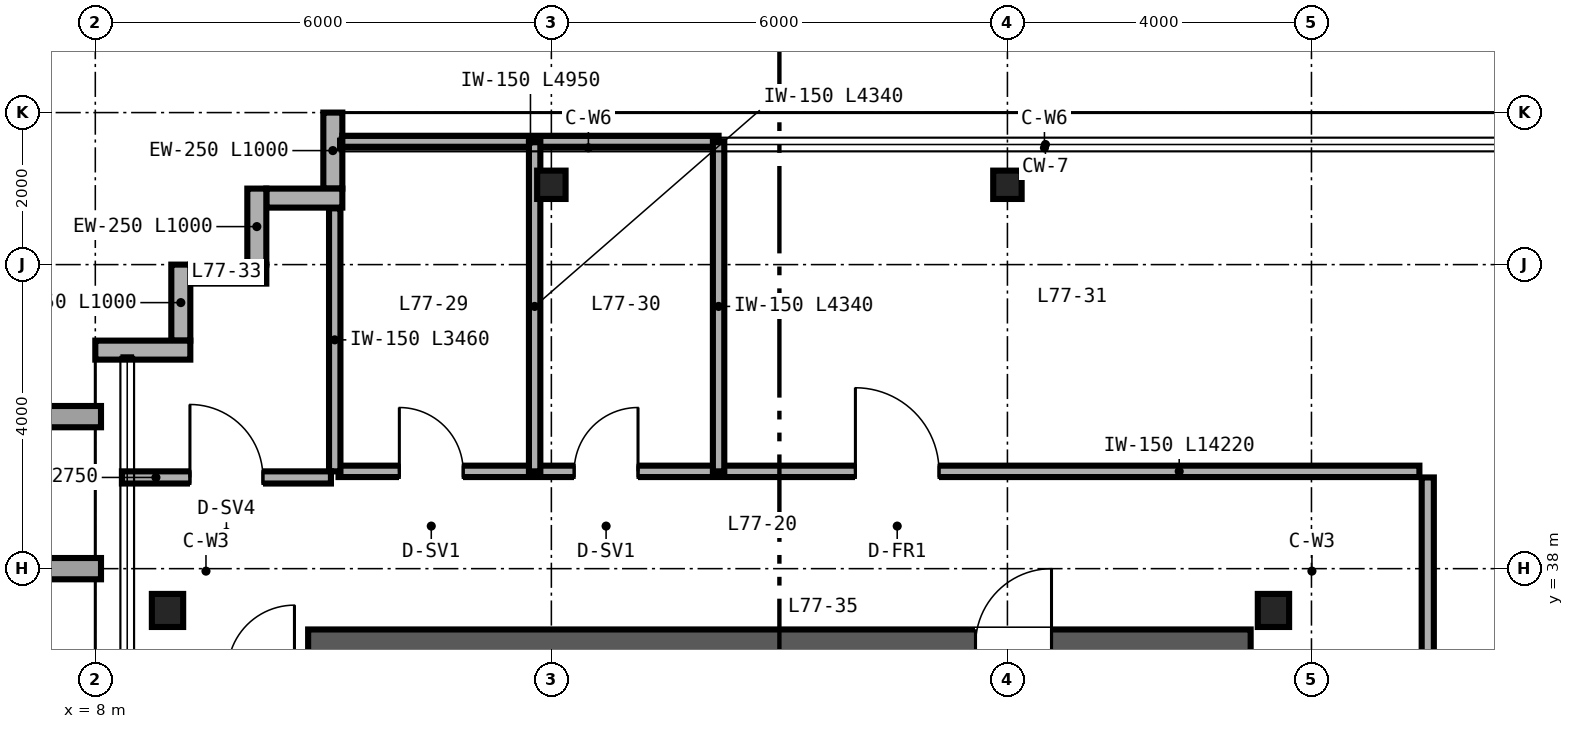
"""IFC4 building model, lengths in metres.
Left out: names, types, materials, properties, quantities, classifications, styles, units other than length and angle.
Written with IfcOpenShell. Run it as: python <this file> out.ifc"""

import sys

from ifc_helpers import new_model, si_unit, direction, frame, frame_2d, origin, origin_2d, place, context, subcontext, project, spatial, rectangle, i_section, extrude, source, transform, mapped, element, fill, save


model = new_model("IFC4")
c1 = context("Model", 3, precision=1e-05, world=origin(), true_north=direction((0.0, 1.0)))
c2 = subcontext(c1, "Body", "Model", "MODEL_VIEW")
j1 = project(units=[si_unit("LENGTHUNIT", "METRE"), si_unit("PLANEANGLEUNIT", "RADIAN")], contexts=[c1])
p1 = place(None, origin())
s1 = spatial("IfcSite", under=j1, at=p1, CompositionType="ELEMENT")
p2 = place(p1, origin())
s2 = spatial("IfcBuilding", under=s1, at=p2, CompositionType="ELEMENT")
p3 = place(p2, frame((0.0, 0.0, 301.2)))
s3 = spatial("IfcBuildingStorey", under=s2, at=p3, CompositionType="ELEMENT", Elevation=301.2)
p4 = place(p3, frame((10.8, 37.0, 0.0), z_axis=(0.0, 0.0, 1.0), x_axis=(1.0, 0.0, 0.0)))
e1 = element("IfcWall", 1, at=p4, inside=s3, PredefinedType="SHEAR", context=c2, shape_type="SweptSolid", body=[
    extrude(rectangle(XDim=12.4, YDim=0.4, at=frame_2d((6.2, 0.0))), origin(), (0.0, 0.0, 1.0), 3.92),
])
p5 = place(p4, frame((8.78, 0.0, 0.0)))
e2 = element("IfcOpeningElement", 2, at=p5, cuts=e1, PredefinedType="OPENING", context=c2, shape_type="SweptSolid", body=[
    extrude(rectangle(XDim=1.0, YDim=2.15, at=frame_2d((0.5, 1.075))), frame((0.0, 0.21, 0.0), z_axis=(0.0, -1.0, 0.0), x_axis=(1.0, 0.0, 0.0)), (0.0, 0.0, 1.0), 0.42),
])
m1 = source(origin(), c2, "Body", "SweptSolid", [
    extrude(i_section(OverallWidth=0.412, OverallDepth=0.435, WebThickness=0.036, FlangeThickness=0.057, FilletRadius=0.025, at=origin_2d()), origin(), (0.0, 0.0, 1.0), 3.92),
])
for number, where, z_axis, x_axis in (
    (3, (8.95, 37.45, 0.0), (0.0, 0.0, 1.0), (1.0, 0.0, 0.0)),
    (4, (23.5, 37.45, 0.0), (0.0, 0.0, 1.0), (1.0, 0.0, 0.0)),
):
    element("IfcColumn", number, at=place(p3, frame(where, z_axis=z_axis, x_axis=x_axis)), inside=s3, PredefinedType="COLUMN", context=c2, shape_type="MappedRepresentation", body=[
        mapped(m1, transform((0.0, 0.0, 0.0), scale=1.0)),
    ])
m2 = source(origin(), c2, "Body", "SweptSolid", [
    extrude(i_section(OverallWidth=0.374, OverallDepth=0.373, WebThickness=0.016, FlangeThickness=0.026, FilletRadius=0.025, at=origin_2d()), origin(), (0.0, 0.0, 1.0), 3.92),
])
for number, where, z_axis, x_axis in (
    (5, (14.0, 43.05, 0.0), (0.0, 0.0, 1.0), (1.0, 0.0, 0.0)),
    (6, (20.0, 43.05, 0.0), (0.0, 0.0, 1.0), (1.0, 0.0, 0.0)),
):
    element("IfcColumn", number, at=place(p3, frame(where, z_axis=z_axis, x_axis=x_axis)), inside=s3, PredefinedType="COLUMN", context=c2, shape_type="MappedRepresentation", body=[
        mapped(m2, transform((0.0, 0.0, 0.0), scale=1.0)),
    ])
for number, where, z_axis, x_axis in (
    (7, (11.125, 44.0, 0.0), (0.0, 0.0, 1.0), (0.0, -1.0, 0.0)),
    (8, (11.25, 42.875, 0.0), (0.0, 0.0, 1.0), (-1.0, 0.0, 0.0)),
    (9, (10.125, 43.0, 0.0), (0.0, 0.0, 1.0), (0.0, -1.0, 0.0)),
    (10, (10.25, 41.875, 0.0), (0.0, 0.0, 1.0), (-1.0, 0.0, 0.0)),
    (11, (9.125, 42.0, 0.0), (0.0, 0.0, 1.0), (0.0, -1.0, 0.0)),
):
    element("IfcWall", number, at=place(p3, frame(where, z_axis=z_axis, x_axis=x_axis)), inside=s3, PredefinedType="SOLIDWALL", context=c2, shape_type="SweptSolid", body=[
        extrude(rectangle(XDim=1.0, YDim=0.25, at=frame_2d((0.5, 0.0))), origin(), (0.0, 0.0, 1.0), 3.92),
    ])
p6 = place(p3, frame((9.25, 40.875, 0.0), z_axis=(0.0, 0.0, 1.0), x_axis=(-1.0, 0.0, 0.0)))
e12 = element("IfcWall", 12, at=p6, inside=s3, PredefinedType="SOLIDWALL", context=c2, shape_type="SweptSolid", body=[
    extrude(rectangle(XDim=1.25, YDim=0.25, at=frame_2d((0.625, 0.0))), origin(), (0.0, 0.0, 1.0), 3.92),
])
p7 = place(p3, frame((25.53, 12.8, 0.0), z_axis=(0.0, 0.0, 1.0), x_axis=(0.0, 1.0, 0.0)))
e13 = element("IfcWall", 13, at=p7, inside=s3, PredefinedType="PARTITIONING", context=c2, shape_type="SweptSolid", body=[
    extrude(rectangle(XDim=26.4, YDim=0.16, at=frame_2d((13.2, 0.0))), origin(), (0.0, 0.0, 1.0), 3.064),
])
p8 = place(p7, frame((4.5, 0.0, 0.0)))
e14 = element("IfcOpeningElement", 14, at=p8, cuts=e13, PredefinedType="OPENING", context=c2, shape_type="SweptSolid", body=[
    extrude(rectangle(XDim=1.1, YDim=2.15, at=frame_2d((0.55, 1.075))), frame((0.0, 0.09, 0.0), z_axis=(0.0, -1.0, 0.0), x_axis=(1.0, 0.0, 0.0)), (0.0, 0.0, 1.0), 0.18),
])
p9 = place(p7, frame((19.5, 0.0, 0.0)))
e15 = element("IfcOpeningElement", 15, at=p9, cuts=e13, PredefinedType="OPENING", context=c2, shape_type="SweptSolid", body=[
    extrude(rectangle(XDim=1.0, YDim=2.15, at=frame_2d((0.5, 1.075))), frame((0.0, 0.09, 0.0), z_axis=(0.0, -1.0, 0.0), x_axis=(1.0, 0.0, 0.0)), (0.0, 0.0, 1.0), 0.18),
])
p10 = place(p3, frame((11.2, 39.28, 0.0), z_axis=(0.0, 0.0, 1.0), x_axis=(1.0, 0.0, 0.0)))
e16 = element("IfcWall", 16, at=p10, inside=s3, PredefinedType="PARTITIONING", context=c2, shape_type="SweptSolid", body=[
    extrude(rectangle(XDim=14.22, YDim=0.15, at=frame_2d((7.11, 0.0))), origin(), (0.0, 0.0, 1.0), 3.92),
])
p11 = place(p10, frame((0.8, 0.0, 0.0)))
e17 = element("IfcOpeningElement", 17, at=p11, cuts=e16, PredefinedType="OPENING", context=c2, shape_type="SweptSolid", body=[
    extrude(rectangle(XDim=0.84, YDim=2.1, at=frame_2d((0.42, 1.05))), frame((0.0, 0.085, 0.0), z_axis=(0.0, -1.0, 0.0), x_axis=(1.0, 0.0, 0.0)), (0.0, 0.0, 1.0), 0.17),
])
p12 = place(p10, frame((3.1, 0.0, 0.0)))
e18 = element("IfcOpeningElement", 18, at=p12, cuts=e16, PredefinedType="OPENING", context=c2, shape_type="SweptSolid", body=[
    extrude(rectangle(XDim=0.84, YDim=2.1, at=frame_2d((0.42, 1.05))), frame((0.0, 0.085, 0.0), z_axis=(0.0, -1.0, 0.0), x_axis=(1.0, 0.0, 0.0)), (0.0, 0.0, 1.0), 0.17),
])
p13 = place(p10, frame((6.8, 0.0, 0.0)))
e19 = element("IfcOpeningElement", 19, at=p13, cuts=e16, PredefinedType="OPENING", context=c2, shape_type="SweptSolid", body=[
    extrude(rectangle(XDim=1.1, YDim=2.15, at=frame_2d((0.55, 1.075))), frame((0.0, 0.085, 0.0), z_axis=(0.0, -1.0, 0.0), x_axis=(1.0, 0.0, 0.0)), (0.0, 0.0, 1.0), 0.17),
])
p14 = place(p3, frame((11.15, 39.28, 0.0), z_axis=(0.0, 0.0, 1.0), x_axis=(0.0, 1.0, 0.0)))
e20 = element("IfcWall", 20, at=p14, inside=s3, PredefinedType="PARTITIONING", context=c2, shape_type="SweptSolid", body=[
    extrude(rectangle(XDim=3.46, YDim=0.15, at=frame_2d((1.73, 0.0))), origin(), (0.0, 0.0, 1.0), 3.92),
])
p15 = place(p3, frame((11.25, 43.62, 0.0), z_axis=(0.0, 0.0, 1.0), x_axis=(1.0, 0.0, 0.0)))
e21 = element("IfcWall", 21, at=p15, inside=s3, PredefinedType="PARTITIONING", context=c2, shape_type="SweptSolid", body=[
    extrude(rectangle(XDim=4.95, YDim=0.15, at=frame_2d((2.475, 0.0))), origin(), (0.0, 0.0, 1.0), 3.92),
])
for number, where, z_axis, x_axis in (
    (22, (13.78, 39.28, 0.0), (0.0, 0.0, 1.0), (0.0, 1.0, 0.0)),
    (23, (16.2, 39.28, 0.0), (0.0, 0.0, 1.0), (0.0, 1.0, 0.0)),
):
    element("IfcWall", number, at=place(p3, frame(where, z_axis=z_axis, x_axis=x_axis)), inside=s3, PredefinedType="PARTITIONING", context=c2, shape_type="SweptSolid", body=[
        extrude(rectangle(XDim=4.34, YDim=0.15, at=frame_2d((2.17, 0.0))), origin(), (0.0, 0.0, 1.0), 3.227),
    ])
p16 = place(p3, frame((8.35, 39.2, 0.0), z_axis=(0.0, 0.0, 1.0), x_axis=(1.0, 0.0, 0.0)))
e24 = element("IfcWall", 24, at=p16, inside=s3, PredefinedType="PARTITIONING", context=c2, shape_type="SweptSolid", body=[
    extrude(rectangle(XDim=2.75, YDim=0.16, at=frame_2d((1.375, 0.0))), origin(), (0.0, 0.0, 1.0), 3.92),
])
p17 = place(p16, frame((0.895, 0.0, 0.0)))
e25 = element("IfcOpeningElement", 25, at=p17, cuts=e24, PredefinedType="OPENING", context=c2, shape_type="SweptSolid", body=[
    extrude(rectangle(XDim=0.96, YDim=2.15, at=frame_2d((0.48, 1.075))), frame((0.0, 0.09, 0.0), z_axis=(0.0, -1.0, 0.0), x_axis=(1.0, 0.0, 0.0)), (0.0, 0.0, 1.0), 0.18),
])
m3 = source(origin(), c2, "Body", "SweptSolid", [
    extrude(rectangle(XDim=1.0, YDim=2.15, at=frame_2d((0.5, 1.075))), frame((0.0, 0.025, 0.0), z_axis=(0.0, -1.0, 0.0), x_axis=(1.0, 0.0, 0.0)), (0.0, 0.0, 1.0), 0.05),
])
p18 = place(p5, origin())
e26 = element("IfcDoor", 26, at=p18, inside=s3, OperationType="SINGLE_SWING_RIGHT", PredefinedType="DOOR", context=c2, shape_type="MappedRepresentation", body=[
    mapped(m3, transform((0.0, 0.0, 0.0), scale=1.0)),
])
fill(e2, e26)
m4 = source(origin(), c2, "Body", "SweptSolid", [
    extrude(rectangle(XDim=0.84, YDim=2.1, at=frame_2d((0.42, 1.05))), frame((0.0, 0.025, 0.0), z_axis=(0.0, -1.0, 0.0), x_axis=(1.0, 0.0, 0.0)), (0.0, 0.0, 1.0), 0.05),
])
p19 = place(p11, origin())
e27 = element("IfcDoor", 27, at=p19, inside=s3, OperationType="SINGLE_SWING_LEFT", PredefinedType="DOOR", context=c2, shape_type="MappedRepresentation", body=[
    mapped(m4, transform((0.0, 0.0, 0.0), scale=1.0)),
])
fill(e17, e27)
p20 = place(p12, origin())
e28 = element("IfcDoor", 28, at=p20, inside=s3, OperationType="SINGLE_SWING_RIGHT", PredefinedType="DOOR", context=c2, shape_type="MappedRepresentation", body=[
    mapped(m4, transform((0.0, 0.0, 0.0), scale=1.0)),
])
fill(e18, e28)
m5 = source(origin(), c2, "Body", "SweptSolid", [
    extrude(rectangle(XDim=1.1, YDim=2.15, at=frame_2d((0.55, 1.075))), frame((0.0, 0.025, 0.0), z_axis=(0.0, -1.0, 0.0), x_axis=(1.0, 0.0, 0.0)), (0.0, 0.0, 1.0), 0.05),
])
p21 = place(p13, origin())
e29 = element("IfcDoor", 29, at=p21, inside=s3, OperationType="SINGLE_SWING_LEFT", PredefinedType="DOOR", context=c2, shape_type="MappedRepresentation", body=[
    mapped(m5, transform((0.0, 0.0, 0.0), scale=1.0)),
])
fill(e19, e29)
m6 = source(origin(), c2, "Body", "SweptSolid", [
    extrude(rectangle(XDim=0.96, YDim=2.15, at=frame_2d((0.48, 1.075))), frame((0.0, 0.025, 0.0), z_axis=(0.0, -1.0, 0.0), x_axis=(1.0, 0.0, 0.0)), (0.0, 0.0, 1.0), 0.05),
])
p22 = place(p17, origin())
e30 = element("IfcDoor", 30, at=p22, inside=s3, OperationType="SINGLE_SWING_LEFT", PredefinedType="DOOR", context=c2, shape_type="MappedRepresentation", body=[
    mapped(m6, transform((0.0, 0.0, 0.0), scale=1.0)),
])
fill(e25, e30)
save(model, sys.argv[1])
